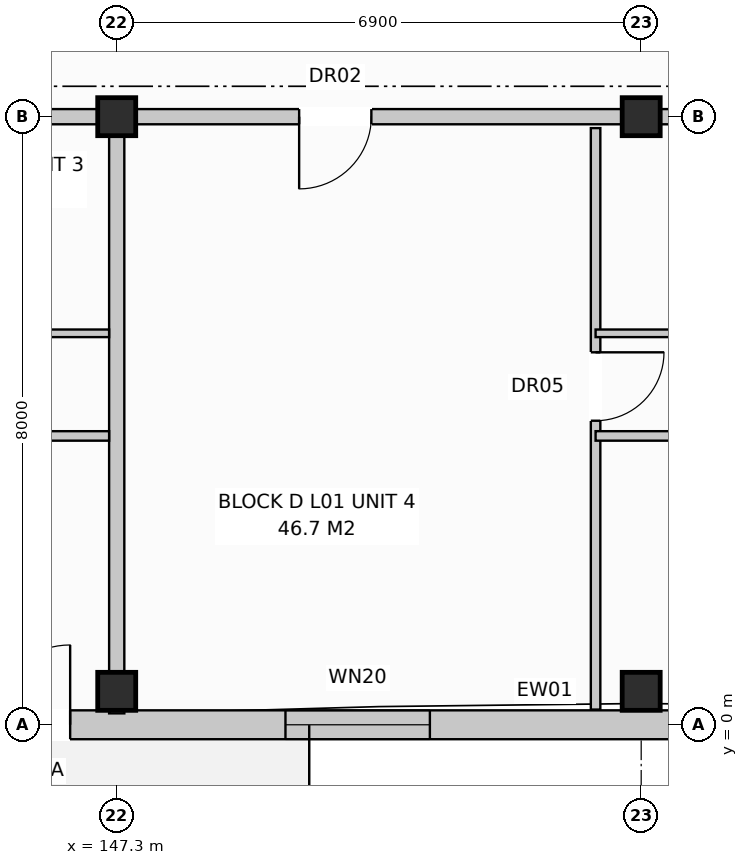
"""IFC4 building model, lengths in metres.
Left out: names, types, materials, properties, quantities, classifications, styles, units other than length and angle.
Written with IfcOpenShell. Run it as: python <this file> out.ifc"""

import sys

from ifc_helpers import new_model, si_unit, direction, frame, frame_2d, origin, origin_with_axes, origin_2d, place, context, subcontext, project, spatial, rectangle, extrude, element, fill, save


model = new_model("IFC4")
c1 = context("Model", 3, precision=1e-05, world=origin(), true_north=direction((0.0, 1.0)))
c2 = subcontext(c1, "Body", "Model", "MODEL_VIEW")
j1 = project(units=[si_unit("LENGTHUNIT", "METRE"), si_unit("PLANEANGLEUNIT", "RADIAN")], contexts=[c1])
p1 = place(None, origin())
s1 = spatial("IfcSite", under=j1, at=p1, CompositionType="ELEMENT")
p2 = place(p1, origin())
s2 = spatial("IfcBuilding", under=s1, at=p2, CompositionType="ELEMENT")
p3 = place(p2, frame((0.0, 0.0, 4.4)))
s3 = spatial("IfcBuildingStorey", under=s2, at=p3, CompositionType="ELEMENT", Elevation=4.4)
for number, where, z_axis, x_axis in (
    (1, (147.3, 0.44, 0.0), (0.0, 0.0, 1.0), (1.0, 0.0, 0.0)),
    (2, (147.3, 8.0, 0.0), (0.0, 0.0, 1.0), (1.0, 0.0, 0.0)),
    (3, (154.2, 0.44, 0.0), (0.0, 0.0, 1.0), (1.0, 0.0, 0.0)),
    (4, (154.2, 8.0, 0.0), (0.0, 0.0, 1.0), (1.0, 0.0, 0.0)),
):
    element("IfcColumn", number, at=place(p3, frame(where, z_axis=z_axis, x_axis=x_axis)), inside=s3, PredefinedType="COLUMN", context=c2, shape_type="SweptSolid", body=[
        extrude(rectangle(XDim=0.5, YDim=0.5, at=origin_2d()), origin(), (0.0, 0.0, 1.0), 3.6),
    ])
p4 = place(p3, frame((112.98, 0.0, 0.0), z_axis=(0.0, 0.0, 1.0), x_axis=(1.0, 0.0, 0.0)))
e5 = element("IfcWall", 5, at=p4, inside=s3, PredefinedType="STANDARD", context=c2, shape_type="SweptSolid", body=[
    extrude(rectangle(XDim=54.84, YDim=0.38, at=frame_2d((27.42, 0.0))), origin(), (0.0, 0.0, 1.0), 3.33),
])
p5 = place(p4, frame((5.04, 0.0, 0.0)))
e6 = element("IfcOpeningElement", 6, at=p5, cuts=e5, PredefinedType="OPENING", context=c2, shape_type="SweptSolid", body=[
    extrude(rectangle(XDim=1.05, YDim=2.12, at=frame_2d((0.525, 1.06))), frame((0.0, 0.202, 0.0), z_axis=(0.0, -1.0, 0.0), x_axis=(1.0, 0.0, 0.0)), (0.0, 0.0, 1.0), 0.404),
])
p6 = place(p4, frame((18.857, 0.0, 0.0)))
e7 = element("IfcOpeningElement", 7, at=p6, cuts=e5, PredefinedType="OPENING", context=c2, shape_type="SweptSolid", body=[
    extrude(rectangle(XDim=1.05, YDim=2.12, at=frame_2d((0.525, 1.06))), frame((0.0, 0.202, 0.0), z_axis=(0.0, -1.0, 0.0), x_axis=(1.0, 0.0, 0.0)), (0.0, 0.0, 1.0), 0.404),
])
p7 = place(p4, frame((32.657, 0.0, 0.0)))
e8 = element("IfcOpeningElement", 8, at=p7, cuts=e5, PredefinedType="OPENING", context=c2, shape_type="SweptSolid", body=[
    extrude(rectangle(XDim=1.05, YDim=2.12, at=frame_2d((0.525, 1.06))), frame((0.0, 0.202, 0.0), z_axis=(0.0, -1.0, 0.0), x_axis=(1.0, 0.0, 0.0)), (0.0, 0.0, 1.0), 0.404),
])
p8 = place(p4, frame((48.74, 0.0, 0.0)))
e9 = element("IfcOpeningElement", 9, at=p8, cuts=e5, PredefinedType="OPENING", context=c2, shape_type="SweptSolid", body=[
    extrude(rectangle(XDim=1.05, YDim=2.12, at=frame_2d((0.525, 1.06))), frame((0.0, 0.202, 0.0), z_axis=(0.0, -1.0, 0.0), x_axis=(1.0, 0.0, 0.0)), (0.0, 0.0, 1.0), 0.404),
])
p9 = place(p4, frame((0.89, 0.0, 0.8)))
e10 = element("IfcOpeningElement", 10, at=p9, cuts=e5, PredefinedType="OPENING", context=c2, shape_type="SweptSolid", body=[
    extrude(rectangle(XDim=1.8, YDim=1.7, at=frame_2d((0.9, 0.85))), frame((0.0, 0.202, 0.0), z_axis=(0.0, -1.0, 0.0), x_axis=(1.0, 0.0, 0.0)), (0.0, 0.0, 1.0), 0.404),
])
p10 = place(p4, frame((7.94, 0.0, 0.8)))
e11 = element("IfcOpeningElement", 11, at=p10, cuts=e5, PredefinedType="OPENING", context=c2, shape_type="SweptSolid", body=[
    extrude(rectangle(XDim=1.9, YDim=1.85, at=frame_2d((0.95, 0.925))), frame((0.0, 0.202, 0.0), z_axis=(0.0, -1.0, 0.0), x_axis=(1.0, 0.0, 0.0)), (0.0, 0.0, 1.0), 0.404),
])
p11 = place(p4, frame((11.215, 0.0, 0.8)))
e12 = element("IfcOpeningElement", 12, at=p11, cuts=e5, PredefinedType="OPENING", context=c2, shape_type="SweptSolid", body=[
    extrude(rectangle(XDim=1.95, YDim=1.65, at=frame_2d((0.975, 0.825))), frame((0.0, 0.202, 0.0), z_axis=(0.0, -1.0, 0.0), x_axis=(1.0, 0.0, 0.0)), (0.0, 0.0, 1.0), 0.404),
])
p12 = place(p4, frame((16.79, 0.0, 0.8)))
e13 = element("IfcOpeningElement", 13, at=p12, cuts=e5, PredefinedType="OPENING", context=c2, shape_type="SweptSolid", body=[
    extrude(rectangle(XDim=1.8, YDim=1.7, at=frame_2d((0.9, 0.85))), frame((0.0, 0.202, 0.0), z_axis=(0.0, -1.0, 0.0), x_axis=(1.0, 0.0, 0.0)), (0.0, 0.0, 1.0), 0.404),
])
p13 = place(p4, frame((22.24, 0.0, 0.8)))
e14 = element("IfcOpeningElement", 14, at=p13, cuts=e5, PredefinedType="OPENING", context=c2, shape_type="SweptSolid", body=[
    extrude(rectangle(XDim=1.9, YDim=1.85, at=frame_2d((0.95, 0.925))), frame((0.0, 0.202, 0.0), z_axis=(0.0, -1.0, 0.0), x_axis=(1.0, 0.0, 0.0)), (0.0, 0.0, 1.0), 0.404),
])
p14 = place(p4, frame((27.873, 0.0, 0.8)))
e15 = element("IfcOpeningElement", 15, at=p14, cuts=e5, PredefinedType="OPENING", context=c2, shape_type="SweptSolid", body=[
    extrude(rectangle(XDim=1.95, YDim=1.65, at=frame_2d((0.975, 0.825))), frame((0.0, 0.202, 0.0), z_axis=(0.0, -1.0, 0.0), x_axis=(1.0, 0.0, 0.0)), (0.0, 0.0, 1.0), 0.404),
])
p15 = place(p4, frame((30.59, 0.0, 0.8)))
e16 = element("IfcOpeningElement", 16, at=p15, cuts=e5, PredefinedType="OPENING", context=c2, shape_type="SweptSolid", body=[
    extrude(rectangle(XDim=1.8, YDim=1.7, at=frame_2d((0.9, 0.85))), frame((0.0, 0.202, 0.0), z_axis=(0.0, -1.0, 0.0), x_axis=(1.0, 0.0, 0.0)), (0.0, 0.0, 1.0), 0.404),
])
p16 = place(p4, frame((36.54, 0.0, 0.8)))
e17 = element("IfcOpeningElement", 17, at=p16, cuts=e5, PredefinedType="OPENING", context=c2, shape_type="SweptSolid", body=[
    extrude(rectangle(XDim=1.9, YDim=1.85, at=frame_2d((0.95, 0.925))), frame((0.0, 0.202, 0.0), z_axis=(0.0, -1.0, 0.0), x_axis=(1.0, 0.0, 0.0)), (0.0, 0.0, 1.0), 0.404),
])
p17 = place(p4, frame((42.215, 0.0, 0.8)))
e18 = element("IfcOpeningElement", 18, at=p17, cuts=e5, PredefinedType="OPENING", context=c2, shape_type="SweptSolid", body=[
    extrude(rectangle(XDim=1.95, YDim=1.65, at=frame_2d((0.975, 0.825))), frame((0.0, 0.202, 0.0), z_axis=(0.0, -1.0, 0.0), x_axis=(1.0, 0.0, 0.0)), (0.0, 0.0, 1.0), 0.404),
])
p18 = place(p4, frame((46.04, 0.0, 0.85)))
e19 = element("IfcOpeningElement", 19, at=p18, cuts=e5, PredefinedType="OPENING", context=c2, shape_type="SweptSolid", body=[
    extrude(rectangle(XDim=1.6, YDim=1.85, at=frame_2d((0.8, 0.925))), frame((0.0, 0.202, 0.0), z_axis=(0.0, -1.0, 0.0), x_axis=(1.0, 0.0, 0.0)), (0.0, 0.0, 1.0), 0.404),
])
p19 = place(p4, frame((52.04, 0.0, 0.8)))
e20 = element("IfcOpeningElement", 20, at=p19, cuts=e5, PredefinedType="OPENING", context=c2, shape_type="SweptSolid", body=[
    extrude(rectangle(XDim=1.9, YDim=1.85, at=frame_2d((0.95, 0.925))), frame((0.0, 0.202, 0.0), z_axis=(0.0, -1.0, 0.0), x_axis=(1.0, 0.0, 0.0)), (0.0, 0.0, 1.0), 0.404),
])
p20 = place(p3, frame((147.3, 7.85, 0.0), z_axis=(0.0, 0.0, 1.0), x_axis=(0.0, -1.0, 0.0)))
e21 = element("IfcWall", 21, at=p20, inside=s3, PredefinedType="PARTITIONING", context=c2, shape_type="SweptSolid", body=[
    extrude(rectangle(XDim=7.7, YDim=0.2, at=frame_2d((3.85, 0.0))), origin(), (0.0, 0.0, 1.0), 3.33),
])
p21 = place(p3, frame((133.5, 8.0, 0.0), z_axis=(0.0, 0.0, 1.0), x_axis=(1.0, 0.0, 0.0)))
e22 = element("IfcWall", 22, at=p21, inside=s3, PredefinedType="PARTITIONING", context=c2, shape_type="SweptSolid", body=[
    extrude(rectangle(XDim=13.8, YDim=0.2, at=frame_2d((6.9, 0.0))), origin(), (0.0, 0.0, 1.0), 2.77),
])
p22 = place(p21, frame((2.4, 0.0, 0.0)))
e23 = element("IfcOpeningElement", 23, at=p22, cuts=e22, PredefinedType="OPENING", context=c2, shape_type="SweptSolid", body=[
    extrude(rectangle(XDim=0.95, YDim=2.15, at=frame_2d((0.475, 1.075))), frame((0.0, 0.112, 0.0), z_axis=(0.0, -1.0, 0.0), x_axis=(1.0, 0.0, 0.0)), (0.0, 0.0, 1.0), 0.224),
])
p23 = place(p3, frame((138.7, 5.15, 0.0), z_axis=(0.0, 0.0, 1.0), x_axis=(1.0, 0.0, 0.0)))
e24 = element("IfcWall", 24, at=p23, inside=s3, PredefinedType="PARTITIONING", context=c2, shape_type="SweptSolid", body=[
    extrude(rectangle(XDim=8.5, YDim=0.1, at=frame_2d((4.25, 0.0))), origin(), (0.0, 0.0, 1.0), 3.33),
])
p24 = place(p23, frame((1.0, 0.0, 0.0)))
e25 = element("IfcOpeningElement", 25, at=p24, cuts=e24, PredefinedType="OPENING", context=c2, shape_type="SweptSolid", body=[
    extrude(rectangle(XDim=0.85, YDim=2.1, at=frame_2d((0.425, 1.05))), frame((0.0, 0.062, 0.0), z_axis=(0.0, -1.0, 0.0), x_axis=(1.0, 0.0, 0.0)), (0.0, 0.0, 1.0), 0.124),
])
p25 = place(p23, frame((3.4, 0.0, 0.0)))
e26 = element("IfcOpeningElement", 26, at=p25, cuts=e24, PredefinedType="OPENING", context=c2, shape_type="SweptSolid", body=[
    extrude(rectangle(XDim=0.85, YDim=2.05, at=frame_2d((0.425, 1.025))), frame((0.0, 0.062, 0.0), z_axis=(0.0, -1.0, 0.0), x_axis=(1.0, 0.0, 0.0)), (0.0, 0.0, 1.0), 0.124),
])
p26 = place(p23, frame((6.2, 0.0, 0.0)))
e27 = element("IfcOpeningElement", 27, at=p26, cuts=e24, PredefinedType="OPENING", context=c2, shape_type="SweptSolid", body=[
    extrude(rectangle(XDim=0.85, YDim=2.05, at=frame_2d((0.425, 1.025))), frame((0.0, 0.062, 0.0), z_axis=(0.0, -1.0, 0.0), x_axis=(1.0, 0.0, 0.0)), (0.0, 0.0, 1.0), 0.124),
])
p27 = place(p3, frame((138.7, 3.8, 0.0), z_axis=(0.0, 0.0, 1.0), x_axis=(1.0, 0.0, 0.0)))
e28 = element("IfcWall", 28, at=p27, inside=s3, PredefinedType="PARTITIONING", context=c2, shape_type="SweptSolid", body=[
    extrude(rectangle(XDim=8.5, YDim=0.125, at=frame_2d((4.25, 0.0))), origin(), (0.0, 0.0, 1.0), 3.33),
])
p28 = place(p27, frame((1.5, 0.0, 0.0)))
e29 = element("IfcOpeningElement", 29, at=p28, cuts=e28, PredefinedType="OPENING", context=c2, shape_type="SweptSolid", body=[
    extrude(rectangle(XDim=0.9, YDim=2.1, at=frame_2d((0.45, 1.05))), frame((0.0, 0.074, 0.0), z_axis=(0.0, -1.0, 0.0), x_axis=(1.0, 0.0, 0.0)), (0.0, 0.0, 1.0), 0.149),
])
p29 = place(p27, frame((5.6, 0.0, 0.0)))
e30 = element("IfcOpeningElement", 30, at=p29, cuts=e28, PredefinedType="OPENING", context=c2, shape_type="SweptSolid", body=[
    extrude(rectangle(XDim=0.9, YDim=2.1, at=frame_2d((0.45, 1.05))), frame((0.0, 0.074, 0.0), z_axis=(0.0, -1.0, 0.0), x_axis=(1.0, 0.0, 0.0)), (0.0, 0.0, 1.0), 0.149),
])
p30 = place(p3, frame((147.3, 8.0, 0.0), z_axis=(0.0, 0.0, 1.0), x_axis=(1.0, 0.0, 0.0)))
e31 = element("IfcWall", 31, at=p30, inside=s3, PredefinedType="PARTITIONING", context=c2, shape_type="SweptSolid", body=[
    extrude(rectangle(XDim=20.7, YDim=0.2, at=frame_2d((10.35, 0.0))), origin(), (0.0, 0.0, 1.0), 2.77),
])
p31 = place(p30, frame((2.4, 0.0, 0.0)))
e32 = element("IfcOpeningElement", 32, at=p31, cuts=e31, PredefinedType="OPENING", context=c2, shape_type="SweptSolid", body=[
    extrude(rectangle(XDim=0.95, YDim=2.15, at=frame_2d((0.475, 1.075))), frame((0.0, 0.112, 0.0), z_axis=(0.0, -1.0, 0.0), x_axis=(1.0, 0.0, 0.0)), (0.0, 0.0, 1.0), 0.224),
])
p32 = place(p3, frame((153.6, 7.85, 0.0), z_axis=(0.0, 0.0, 1.0), x_axis=(0.0, -1.0, 0.0)))
e33 = element("IfcWall", 33, at=p32, inside=s3, PredefinedType="PARTITIONING", context=c2, shape_type="SweptSolid", body=[
    extrude(rectangle(XDim=7.65, YDim=0.125, at=frame_2d((3.825, 0.0))), origin(), (0.0, 0.0, 1.0), 3.33),
])
p33 = place(p32, frame((2.95, 0.0, 0.0)))
e34 = element("IfcOpeningElement", 34, at=p33, cuts=e33, PredefinedType="OPENING", context=c2, shape_type="SweptSolid", body=[
    extrude(rectangle(XDim=0.9, YDim=2.1, at=frame_2d((0.45, 1.05))), frame((0.0, 0.074, 0.0), z_axis=(0.0, -1.0, 0.0), x_axis=(1.0, 0.0, 0.0)), (0.0, 0.0, 1.0), 0.149),
])
p34 = place(p3, frame((153.6, 5.15, 0.0), z_axis=(0.0, 0.0, 1.0), x_axis=(1.0, 0.0, 0.0)))
e35 = element("IfcWall", 35, at=p34, inside=s3, PredefinedType="PARTITIONING", context=c2, shape_type="SweptSolid", body=[
    extrude(rectangle(XDim=14.3, YDim=0.1, at=frame_2d((7.15, 0.0))), origin(), (0.0, 0.0, 1.0), 3.33),
])
p35 = place(p34, frame((1.6, 0.0, 0.0)))
e36 = element("IfcOpeningElement", 36, at=p35, cuts=e35, PredefinedType="OPENING", context=c2, shape_type="SweptSolid", body=[
    extrude(rectangle(XDim=0.9, YDim=2.1, at=frame_2d((0.45, 1.05))), frame((0.0, 0.062, 0.0), z_axis=(0.0, -1.0, 0.0), x_axis=(1.0, 0.0, 0.0)), (0.0, 0.0, 1.0), 0.124),
])
p36 = place(p34, frame((5.1, 0.0, 0.0)))
e37 = element("IfcOpeningElement", 37, at=p36, cuts=e35, PredefinedType="OPENING", context=c2, shape_type="SweptSolid", body=[
    extrude(rectangle(XDim=0.85, YDim=2.05, at=frame_2d((0.425, 1.025))), frame((0.0, 0.062, 0.0), z_axis=(0.0, -1.0, 0.0), x_axis=(1.0, 0.0, 0.0)), (0.0, 0.0, 1.0), 0.124),
])
p37 = place(p34, frame((8.2, 0.0, 0.0)))
e38 = element("IfcOpeningElement", 38, at=p37, cuts=e35, PredefinedType="OPENING", context=c2, shape_type="SweptSolid", body=[
    extrude(rectangle(XDim=0.85, YDim=2.05, at=frame_2d((0.425, 1.025))), frame((0.0, 0.062, 0.0), z_axis=(0.0, -1.0, 0.0), x_axis=(1.0, 0.0, 0.0)), (0.0, 0.0, 1.0), 0.124),
])
p38 = place(p34, frame((11.6, 0.0, 0.0)))
e39 = element("IfcOpeningElement", 39, at=p38, cuts=e35, PredefinedType="OPENING", context=c2, shape_type="SweptSolid", body=[
    extrude(rectangle(XDim=0.85, YDim=2.05, at=frame_2d((0.425, 1.025))), frame((0.0, 0.062, 0.0), z_axis=(0.0, -1.0, 0.0), x_axis=(1.0, 0.0, 0.0)), (0.0, 0.0, 1.0), 0.124),
])
p39 = place(p3, frame((153.6, 3.8, 0.0), z_axis=(0.0, 0.0, 1.0), x_axis=(1.0, 0.0, 0.0)))
e40 = element("IfcWall", 40, at=p39, inside=s3, PredefinedType="PARTITIONING", context=c2, shape_type="SweptSolid", body=[
    extrude(rectangle(XDim=10.4, YDim=0.125, at=frame_2d((5.2, 0.0))), origin(), (0.0, 0.0, 1.0), 3.33),
])
p40 = place(p39, frame((2.0, 0.0, 0.0)))
e41 = element("IfcOpeningElement", 41, at=p40, cuts=e40, PredefinedType="OPENING", context=c2, shape_type="SweptSolid", body=[
    extrude(rectangle(XDim=0.9, YDim=2.1, at=frame_2d((0.45, 1.05))), frame((0.0, 0.074, 0.0), z_axis=(0.0, -1.0, 0.0), x_axis=(1.0, 0.0, 0.0)), (0.0, 0.0, 1.0), 0.149),
])
p41 = place(p39, frame((7.2, 0.0, 0.0)))
e42 = element("IfcOpeningElement", 42, at=p41, cuts=e40, PredefinedType="OPENING", context=c2, shape_type="SweptSolid", body=[
    extrude(rectangle(XDim=0.9, YDim=2.1, at=frame_2d((0.45, 1.05))), frame((0.0, 0.074, 0.0), z_axis=(0.0, -1.0, 0.0), x_axis=(1.0, 0.0, 0.0)), (0.0, 0.0, 1.0), 0.149),
])
p42 = place(p7, origin_with_axes())
e43 = element("IfcDoor", 43, at=p42, inside=s3, OperationType="SINGLE_SWING_RIGHT", PredefinedType="DOOR", context=c2, shape_type="SweptSolid", body=[
    extrude(rectangle(XDim=1.05, YDim=2.12, at=frame_2d((0.525, 1.06))), frame((0.0, 0.025, 0.0), z_axis=(0.0, -1.0, 0.0), x_axis=(1.0, 0.0, 0.0)), (0.0, 0.0, 1.0), 0.05),
])
fill(e8, e43)
p43 = place(p16, origin_with_axes())
e44 = element("IfcWindow", 44, at=p43, inside=s3, PartitioningType="SINGLE_PANEL", PredefinedType="WINDOW", context=c2, shape_type="SweptSolid", body=[
    extrude(rectangle(XDim=1.9, YDim=1.85, at=frame_2d((0.95, 0.925))), frame((0.0, 0.03, 0.0), z_axis=(0.0, -1.0, 0.0), x_axis=(1.0, 0.0, 0.0)), (0.0, 0.0, 1.0), 0.06),
])
fill(e17, e44)
p44 = place(p31, frame((0.95, 0.0, 0.0), z_axis=(0.0, 0.0, 1.0), x_axis=(-1.0, 0.0, 0.0)))
e45 = element("IfcDoor", 45, at=p44, inside=s3, OperationType="SINGLE_SWING_LEFT", PredefinedType="DOOR", context=c2, shape_type="SweptSolid", body=[
    extrude(rectangle(XDim=0.95, YDim=2.15, at=frame_2d((0.475, 1.075))), frame((0.0, 0.025, 0.0), z_axis=(0.0, -1.0, 0.0), x_axis=(1.0, 0.0, 0.0)), (0.0, 0.0, 1.0), 0.05),
])
fill(e32, e45)
p45 = place(p33, origin_with_axes())
e46 = element("IfcDoor", 46, at=p45, inside=s3, OperationType="SINGLE_SWING_LEFT", PredefinedType="DOOR", context=c2, shape_type="SweptSolid", body=[
    extrude(rectangle(XDim=0.9, YDim=2.1, at=frame_2d((0.45, 1.05))), frame((0.0, 0.025, 0.0), z_axis=(0.0, -1.0, 0.0), x_axis=(1.0, 0.0, 0.0)), (0.0, 0.0, 1.0), 0.05),
])
fill(e34, e46)
save(model, sys.argv[1])
